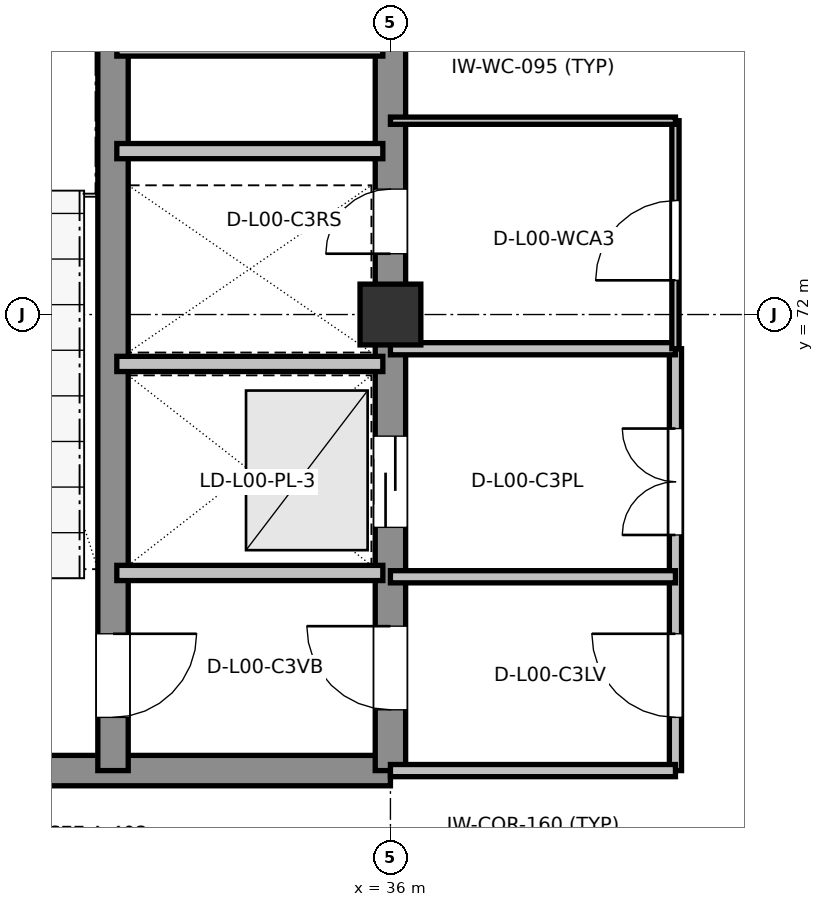
"""IFC4 building model, lengths in metres.
Left out: names, types, materials, properties, quantities, classifications, styles, units other than length and angle.
Written with IfcOpenShell. Run it as: python <this file> out.ifc"""

import sys

from ifc_helpers import new_model, si_unit, direction, frame, frame_2d, origin, origin_2d, place, context, subcontext, project, spatial, rectangle, extrude, element, fill, save


model = new_model("IFC4")
c1 = context("Model", 3, precision=1e-05, world=origin(), true_north=direction((0.0, 1.0)))
c2 = subcontext(c1, "Body", "Model", "MODEL_VIEW")
j1 = project(units=[si_unit("LENGTHUNIT", "METRE"), si_unit("PLANEANGLEUNIT", "RADIAN")], contexts=[c1])
p1 = place(None, origin())
s1 = spatial("IfcSite", under=j1, at=p1, CompositionType="ELEMENT")
p2 = place(p1, origin())
s2 = spatial("IfcBuilding", under=s1, at=p2, CompositionType="ELEMENT")
p3 = place(p2, origin())
s3 = spatial("IfcBuildingStorey", under=s2, at=p3, CompositionType="ELEMENT", Elevation=0.0)
p4 = place(p3, frame((36.0, 72.0, 0.0), z_axis=(0.0, 0.0, 1.0), x_axis=(1.0, 0.0, 0.0)))
e1 = element("IfcColumn", 1, at=p4, inside=s3, PredefinedType="COLUMN", context=c2, shape_type="SweptSolid", body=[
    extrude(rectangle(XDim=0.8, YDim=0.8, at=origin_2d()), origin(), (0.0, 0.0, 1.0), 5.4),
])
p5 = place(p3, frame((27.0, 66.0, 0.0), z_axis=(0.0, 0.0, 1.0), x_axis=(1.0, 0.0, 0.0)))
e2 = element("IfcWall", 2, at=p5, inside=s3, PredefinedType="SHEAR", context=c2, shape_type="SweptSolid", body=[
    extrude(rectangle(XDim=9.0, YDim=0.4, at=frame_2d((4.5, 0.0))), origin(), (0.0, 0.0, 1.0), 5.16),
])
p6 = place(p3, frame((36.0, 66.0, 0.0), z_axis=(0.0, 0.0, 1.0), x_axis=(0.0, 1.0, 0.0)))
e3 = element("IfcWall", 3, at=p6, inside=s3, PredefinedType="SHEAR", context=c2, shape_type="SweptSolid", body=[
    extrude(rectangle(XDim=18.0, YDim=0.4, at=frame_2d((9.0, 0.0))), origin(), (0.0, 0.0, 1.0), 5.16),
])
p7 = place(p6, frame((0.8, 0.0, 0.0)))
e4 = element("IfcOpeningElement", 4, at=p7, cuts=e3, PredefinedType="OPENING", context=c2, shape_type="SweptSolid", body=[
    extrude(rectangle(XDim=1.1, YDim=2.16, at=frame_2d((0.55, 1.08))), frame((0.0, 0.21, 0.0), z_axis=(0.0, -1.0, 0.0), x_axis=(1.0, 0.0, 0.0)), (0.0, 0.0, 1.0), 0.42),
])
p8 = place(p6, frame((3.2, 0.0, 0.0)))
e5 = element("IfcOpeningElement", 5, at=p8, cuts=e3, PredefinedType="OPENING", context=c2, shape_type="SweptSolid", body=[
    extrude(rectangle(XDim=1.2, YDim=2.2, at=frame_2d((0.6, 1.1))), frame((0.0, 0.21, 0.0), z_axis=(0.0, -1.0, 0.0), x_axis=(1.0, 0.0, 0.0)), (0.0, 0.0, 1.0), 0.42),
])
p9 = place(p6, frame((6.8, 0.0, 0.0)))
e6 = element("IfcOpeningElement", 6, at=p9, cuts=e3, PredefinedType="OPENING", context=c2, shape_type="SweptSolid", body=[
    extrude(rectangle(XDim=0.85, YDim=2.1, at=frame_2d((0.425, 1.05))), frame((0.0, 0.21, 0.0), z_axis=(0.0, -1.0, 0.0), x_axis=(1.0, 0.0, 0.0)), (0.0, 0.0, 1.0), 0.42),
])
p10 = place(p3, frame((32.35, 66.0, 0.0), z_axis=(0.0, 0.0, 1.0), x_axis=(0.0, 1.0, 0.0)))
e7 = element("IfcWall", 7, at=p10, inside=s3, PredefinedType="SHEAR", context=c2, shape_type="SweptSolid", body=[
    extrude(rectangle(XDim=18.0, YDim=0.4, at=frame_2d((9.0, 0.0))), origin(), (0.0, 0.0, 1.0), 5.16),
])
p11 = place(p10, frame((0.7, 0.0, 0.0)))
e8 = element("IfcOpeningElement", 8, at=p11, cuts=e7, PredefinedType="OPENING", context=c2, shape_type="SweptSolid", body=[
    extrude(rectangle(XDim=1.1, YDim=2.16, at=frame_2d((0.55, 1.08))), frame((0.0, 0.21, 0.0), z_axis=(0.0, -1.0, 0.0), x_axis=(1.0, 0.0, 0.0)), (0.0, 0.0, 1.0), 0.42),
])
for number, where, z_axis, x_axis in (
    (9, (32.4, 68.6, 0.0), (0.0, 0.0, 1.0), (1.0, 0.0, 0.0)),
    (10, (32.4, 71.35, 0.0), (0.0, 0.0, 1.0), (1.0, 0.0, 0.0)),
    (11, (32.4, 74.15, 0.0), (0.0, 0.0, 1.0), (1.0, 0.0, 0.0)),
    (12, (32.4, 75.5, 0.0), (0.0, 0.0, 1.0), (1.0, 0.0, 0.0)),
):
    element("IfcWall", number, at=place(p3, frame(where, z_axis=z_axis, x_axis=x_axis)), inside=s3, PredefinedType="PARTITIONING", context=c2, shape_type="SweptSolid", body=[
        extrude(rectangle(XDim=3.5, YDim=0.2, at=frame_2d((1.75, 0.0))), origin(), (0.0, 0.0, 1.0), 5.16),
    ])
p12 = place(p3, frame((39.75, 66.0, 0.0), z_axis=(0.0, 0.0, 1.0), x_axis=(0.0, 1.0, 0.0)))
e13 = element("IfcWall", 13, at=p12, inside=s3, PredefinedType="PARTITIONING", context=c2, shape_type="SweptSolid", body=[
    extrude(rectangle(XDim=5.55, YDim=0.16, at=frame_2d((2.775, 0.0))), origin(), (0.0, 0.0, 1.0), 5.16),
])
p13 = place(p12, frame((0.7, 0.0, 0.0)))
e14 = element("IfcOpeningElement", 14, at=p13, cuts=e13, PredefinedType="OPENING", context=c2, shape_type="SweptSolid", body=[
    extrude(rectangle(XDim=1.1, YDim=2.16, at=frame_2d((0.55, 1.08))), frame((0.0, 0.09, 0.0), z_axis=(0.0, -1.0, 0.0), x_axis=(1.0, 0.0, 0.0)), (0.0, 0.0, 1.0), 0.18),
])
p14 = place(p12, frame((3.1, 0.0, 0.0)))
e15 = element("IfcOpeningElement", 15, at=p14, cuts=e13, PredefinedType="OPENING", context=c2, shape_type="SweptSolid", body=[
    extrude(rectangle(XDim=1.4, YDim=2.2, at=frame_2d((0.7, 1.1))), frame((0.0, 0.09, 0.0), z_axis=(0.0, -1.0, 0.0), x_axis=(1.0, 0.0, 0.0)), (0.0, 0.0, 1.0), 0.18),
])
p15 = place(p3, frame((36.0, 66.0, 0.0), z_axis=(0.0, 0.0, 1.0), x_axis=(1.0, 0.0, 0.0)))
e16 = element("IfcWall", 16, at=p15, inside=s3, PredefinedType="PARTITIONING", context=c2, shape_type="SweptSolid", body=[
    extrude(rectangle(XDim=3.75, YDim=0.16, at=frame_2d((1.875, 0.0))), origin(), (0.0, 0.0, 1.0), 4.745),
])
for number, where, z_axis, x_axis in (
    (17, (36.0, 68.55, 0.0), (0.0, 0.0, 1.0), (1.0, 0.0, 0.0)),
    (18, (36.0, 71.55, 0.0), (0.0, 0.0, 1.0), (1.0, 0.0, 0.0)),
):
    element("IfcWall", number, at=place(p3, frame(where, z_axis=z_axis, x_axis=x_axis)), inside=s3, PredefinedType="PARTITIONING", context=c2, shape_type="SweptSolid", body=[
        extrude(rectangle(XDim=3.75, YDim=0.16, at=frame_2d((1.875, 0.0))), origin(), (0.0, 0.0, 1.0), 5.16),
    ])
p16 = place(p3, frame((39.75, 71.55, 0.0), z_axis=(0.0, 0.0, 1.0), x_axis=(0.0, 1.0, 0.0)))
e19 = element("IfcWall", 19, at=p16, inside=s3, PredefinedType="PARTITIONING", context=c2, shape_type="SweptSolid", body=[
    extrude(rectangle(XDim=3.0, YDim=0.095, at=frame_2d((1.5, 0.0))), origin(), (0.0, 0.0, 1.0), 5.16),
])
p17 = place(p16, frame((0.9, 0.0, 0.0)))
e20 = element("IfcOpeningElement", 20, at=p17, cuts=e19, PredefinedType="OPENING", context=c2, shape_type="SweptSolid", body=[
    extrude(rectangle(XDim=1.05, YDim=2.13, at=frame_2d((0.525, 1.065))), frame((0.0, 0.057, 0.0), z_axis=(0.0, -1.0, 0.0), x_axis=(1.0, 0.0, 0.0)), (0.0, 0.0, 1.0), 0.115),
])
p18 = place(p3, frame((36.0, 74.55, 0.0), z_axis=(0.0, 0.0, 1.0), x_axis=(1.0, 0.0, 0.0)))
e21 = element("IfcWall", 21, at=p18, inside=s3, PredefinedType="PARTITIONING", context=c2, shape_type="SweptSolid", body=[
    extrude(rectangle(XDim=3.75, YDim=0.095, at=frame_2d((1.875, 0.0))), origin(), (0.0, 0.0, 1.0), 5.16),
])
p19 = place(p11, frame((1.1, 0.0, 0.0), z_axis=(0.0, 0.0, 1.0), x_axis=(-1.0, 0.0, 0.0)))
e22 = element("IfcDoor", 22, at=p19, inside=s3, OperationType="SINGLE_SWING_LEFT", PredefinedType="DOOR", context=c2, shape_type="SweptSolid", body=[
    extrude(rectangle(XDim=1.1, YDim=2.16, at=frame_2d((0.55, 1.08))), frame((0.0, 0.025, 0.0), z_axis=(0.0, -1.0, 0.0), x_axis=(1.0, 0.0, 0.0)), (0.0, 0.0, 1.0), 0.05),
])
fill(e8, e22)
p20 = place(p7, origin())
e23 = element("IfcDoor", 23, at=p20, inside=s3, OperationType="SINGLE_SWING_RIGHT", PredefinedType="DOOR", context=c2, shape_type="SweptSolid", body=[
    extrude(rectangle(XDim=1.1, YDim=2.16, at=frame_2d((0.55, 1.08))), frame((0.0, 0.025, 0.0), z_axis=(0.0, -1.0, 0.0), x_axis=(1.0, 0.0, 0.0)), (0.0, 0.0, 1.0), 0.05),
])
fill(e4, e23)
p21 = place(p8, origin())
e24 = element("IfcDoor", 24, at=p21, inside=s3, OperationType="SLIDING_TO_LEFT", PredefinedType="DOOR", context=c2, shape_type="SweptSolid", body=[
    extrude(rectangle(XDim=1.2, YDim=2.2, at=frame_2d((0.6, 1.1))), frame((0.0, 0.025, 0.0), z_axis=(0.0, -1.0, 0.0), x_axis=(1.0, 0.0, 0.0)), (0.0, 0.0, 1.0), 0.05),
])
fill(e5, e24)
p22 = place(p9, origin())
e25 = element("IfcDoor", 25, at=p22, inside=s3, OperationType="SINGLE_SWING_LEFT", PredefinedType="DOOR", context=c2, shape_type="SweptSolid", body=[
    extrude(rectangle(XDim=0.85, YDim=2.1, at=frame_2d((0.425, 1.05))), frame((0.0, 0.025, 0.0), z_axis=(0.0, -1.0, 0.0), x_axis=(1.0, 0.0, 0.0)), (0.0, 0.0, 1.0), 0.05),
])
fill(e6, e25)
p23 = place(p13, origin())
e26 = element("IfcDoor", 26, at=p23, inside=s3, OperationType="SINGLE_SWING_RIGHT", PredefinedType="DOOR", context=c2, shape_type="SweptSolid", body=[
    extrude(rectangle(XDim=1.1, YDim=2.16, at=frame_2d((0.55, 1.08))), frame((0.0, 0.025, 0.0), z_axis=(0.0, -1.0, 0.0), x_axis=(1.0, 0.0, 0.0)), (0.0, 0.0, 1.0), 0.05),
])
fill(e14, e26)
p24 = place(p14, origin())
e27 = element("IfcDoor", 27, at=p24, inside=s3, OperationType="DOUBLE_DOOR_SINGLE_SWING", PredefinedType="DOOR", context=c2, shape_type="SweptSolid", body=[
    extrude(rectangle(XDim=1.4, YDim=2.2, at=frame_2d((0.7, 1.1))), frame((0.0, 0.025, 0.0), z_axis=(0.0, -1.0, 0.0), x_axis=(1.0, 0.0, 0.0)), (0.0, 0.0, 1.0), 0.05),
])
fill(e15, e27)
p25 = place(p17, origin())
e28 = element("IfcDoor", 28, at=p25, inside=s3, OperationType="SINGLE_SWING_LEFT", PredefinedType="DOOR", context=c2, shape_type="SweptSolid", body=[
    extrude(rectangle(XDim=1.05, YDim=2.13, at=frame_2d((0.525, 1.065))), frame((0.0, 0.025, 0.0), z_axis=(0.0, -1.0, 0.0), x_axis=(1.0, 0.0, 0.0)), (0.0, 0.0, 1.0), 0.05),
])
fill(e20, e28)
save(model, sys.argv[1])
